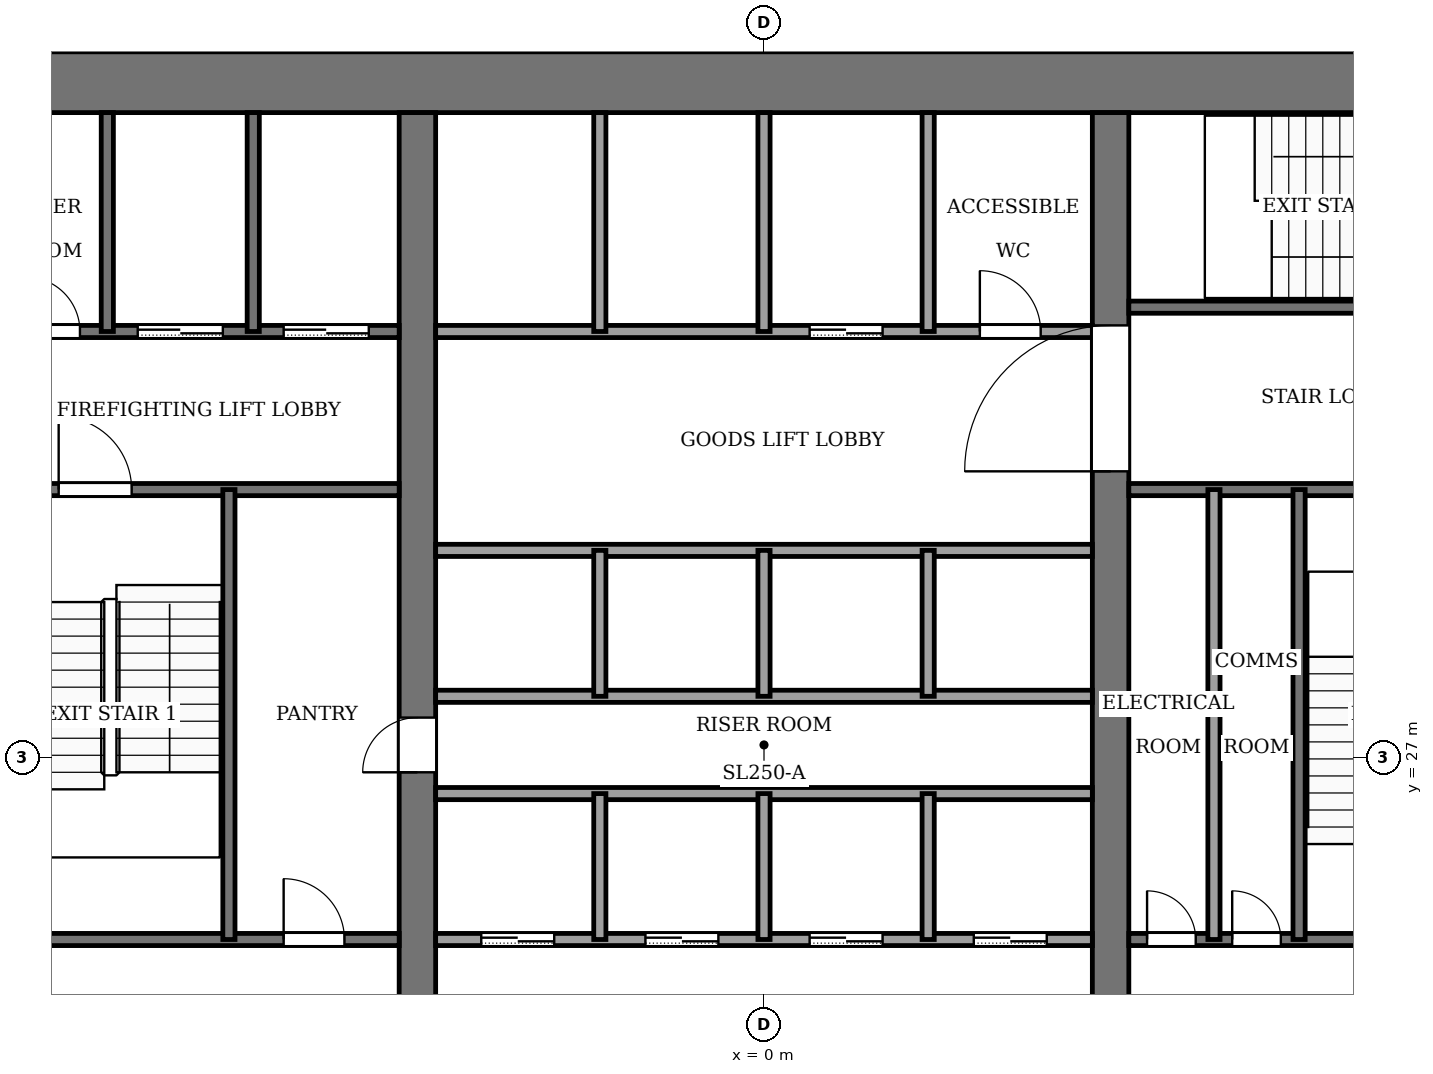
"""IFC4 building model, lengths in metres.
Left out: names, types, materials, properties, quantities, classifications, styles, units other than length and angle.
Written with IfcOpenShell. Run it as: python <this file> out.ifc"""

import sys

from ifc_helpers import new_model, si_unit, direction, frame, frame_2d, origin, place, context, subcontext, project, spatial, rectangle, extrude, element, fill, save


model = new_model("IFC4")
c1 = context("Model", 3, precision=1e-05, world=origin(), true_north=direction((0.0, 1.0)))
c2 = subcontext(c1, "Body", "Model", "MODEL_VIEW")
j1 = project(units=[si_unit("LENGTHUNIT", "METRE"), si_unit("PLANEANGLEUNIT", "RADIAN")], contexts=[c1])
p1 = place(None, origin())
s1 = spatial("IfcSite", under=j1, at=p1, CompositionType="ELEMENT")
p2 = place(p1, origin())
s2 = spatial("IfcBuilding", under=s1, at=p2, CompositionType="ELEMENT")
p3 = place(p2, frame((0.0, 0.0, 126.0)))
s3 = spatial("IfcBuildingStorey", under=s2, at=p3, CompositionType="ELEMENT", Elevation=126.0)
p4 = place(p3, frame((-13.6, 38.1, -0.13), z_axis=(0.0, 0.0, 1.0), x_axis=(1.0, 0.0, 0.0)))
e1 = element("IfcWall", 1, at=p4, inside=s3, PredefinedType="SHEAR", context=c2, shape_type="SweptSolid", body=[
    extrude(rectangle(XDim=27.2, YDim=1.0, at=frame_2d((13.6, 0.0))), origin(), (0.0, 0.0, 1.0), 4.0),
])
p5 = place(p3, frame((-5.7, 18.4, -0.13), z_axis=(0.0, 0.0, 1.0), x_axis=(0.0, 1.0, 0.0)))
e2 = element("IfcWall", 2, at=p5, inside=s3, PredefinedType="SHEAR", context=c2, shape_type="SweptSolid", body=[
    extrude(rectangle(XDim=19.2, YDim=0.6, at=frame_2d((9.6, 0.0))), origin(), (0.0, 0.0, 1.0), 4.0),
])
p6 = place(p5, frame((8.35, 0.0, 0.13)))
e3 = element("IfcOpeningElement", 3, at=p6, cuts=e2, PredefinedType="OPENING", context=c2, shape_type="SweptSolid", body=[
    extrude(rectangle(XDim=0.9, YDim=2.1, at=frame_2d((0.45, 1.05))), frame((0.0, 0.31, 0.0), z_axis=(0.0, -1.0, 0.0), x_axis=(1.0, 0.0, 0.0)), (0.0, 0.0, 1.0), 0.62),
])
p7 = place(p3, frame((5.7, 18.4, -0.13), z_axis=(0.0, 0.0, 1.0), x_axis=(0.0, 1.0, 0.0)))
e4 = element("IfcWall", 4, at=p7, inside=s3, PredefinedType="SHEAR", context=c2, shape_type="SweptSolid", body=[
    extrude(rectangle(XDim=19.2, YDim=0.6, at=frame_2d((9.6, 0.0))), origin(), (0.0, 0.0, 1.0), 4.0),
])
p8 = place(p7, frame((13.3, 0.0, 0.13)))
e5 = element("IfcOpeningElement", 5, at=p8, cuts=e4, PredefinedType="OPENING", context=c2, shape_type="SweptSolid", body=[
    extrude(rectangle(XDim=2.4, YDim=2.4, at=frame_2d((1.2, 1.2))), frame((0.0, 0.31, 0.0), z_axis=(0.0, -1.0, 0.0), x_axis=(1.0, 0.0, 0.0)), (0.0, 0.0, 1.0), 0.62),
])
p9 = place(p3, frame((-12.6, 24.0, 0.0), z_axis=(0.0, 0.0, 1.0), x_axis=(1.0, 0.0, 0.0)))
e6 = element("IfcWall", 6, at=p9, inside=s3, PredefinedType="PARTITIONING", context=c2, shape_type="SweptSolid", body=[
    extrude(rectangle(XDim=6.6, YDim=0.2, at=frame_2d((3.3, 0.0))), origin(), (0.0, 0.0, 1.0), 3.87),
])
p10 = place(p9, frame((4.7, 0.0, 0.0)))
e7 = element("IfcOpeningElement", 7, at=p10, cuts=e6, PredefinedType="OPENING", context=c2, shape_type="SweptSolid", body=[
    extrude(rectangle(XDim=1.0, YDim=2.1, at=frame_2d((0.5, 1.05))), frame((0.0, 0.11, 0.0), z_axis=(0.0, -1.0, 0.0), x_axis=(1.0, 0.0, 0.0)), (0.0, 0.0, 1.0), 0.22),
])
p11 = place(p3, frame((-5.4, 24.0, 0.0), z_axis=(0.0, 0.0, 1.0), x_axis=(1.0, 0.0, 0.0)))
e8 = element("IfcWall", 8, at=p11, inside=s3, PredefinedType="PARTITIONING", context=c2, shape_type="SweptSolid", body=[
    extrude(rectangle(XDim=10.8, YDim=0.2, at=frame_2d((5.4, 0.0))), origin(), (0.0, 0.0, 1.0), 3.87),
])
p12 = place(p11, frame((0.75, 0.0, 0.0)))
e9 = element("IfcOpeningElement", 9, at=p12, cuts=e8, PredefinedType="OPENING", context=c2, shape_type="SweptSolid", body=[
    extrude(rectangle(XDim=1.2, YDim=2.2, at=frame_2d((0.6, 1.1))), frame((0.0, 0.11, 0.0), z_axis=(0.0, -1.0, 0.0), x_axis=(1.0, 0.0, 0.0)), (0.0, 0.0, 1.0), 0.22),
])
p13 = place(p11, frame((3.45, 0.0, 0.0)))
e10 = element("IfcOpeningElement", 10, at=p13, cuts=e8, PredefinedType="OPENING", context=c2, shape_type="SweptSolid", body=[
    extrude(rectangle(XDim=1.2, YDim=2.2, at=frame_2d((0.6, 1.1))), frame((0.0, 0.11, 0.0), z_axis=(0.0, -1.0, 0.0), x_axis=(1.0, 0.0, 0.0)), (0.0, 0.0, 1.0), 0.22),
])
p14 = place(p11, frame((6.15, 0.0, 0.0)))
e11 = element("IfcOpeningElement", 11, at=p14, cuts=e8, PredefinedType="OPENING", context=c2, shape_type="SweptSolid", body=[
    extrude(rectangle(XDim=1.2, YDim=2.2, at=frame_2d((0.6, 1.1))), frame((0.0, 0.11, 0.0), z_axis=(0.0, -1.0, 0.0), x_axis=(1.0, 0.0, 0.0)), (0.0, 0.0, 1.0), 0.22),
])
p15 = place(p11, frame((8.85, 0.0, 0.0)))
e12 = element("IfcOpeningElement", 12, at=p15, cuts=e8, PredefinedType="OPENING", context=c2, shape_type="SweptSolid", body=[
    extrude(rectangle(XDim=1.2, YDim=2.2, at=frame_2d((0.6, 1.1))), frame((0.0, 0.11, 0.0), z_axis=(0.0, -1.0, 0.0), x_axis=(1.0, 0.0, 0.0)), (0.0, 0.0, 1.0), 0.22),
])
p16 = place(p3, frame((6.0, 24.0, 0.0), z_axis=(0.0, 0.0, 1.0), x_axis=(1.0, 0.0, 0.0)))
e13 = element("IfcWall", 13, at=p16, inside=s3, PredefinedType="PARTITIONING", context=c2, shape_type="SweptSolid", body=[
    extrude(rectangle(XDim=6.6, YDim=0.2, at=frame_2d((3.3, 0.0))), origin(), (0.0, 0.0, 1.0), 3.87),
])
p17 = place(p16, frame((0.3, 0.0, 0.0)))
e14 = element("IfcOpeningElement", 14, at=p17, cuts=e13, PredefinedType="OPENING", context=c2, shape_type="SweptSolid", body=[
    extrude(rectangle(XDim=0.8, YDim=2.1, at=frame_2d((0.4, 1.05))), frame((0.0, 0.11, 0.0), z_axis=(0.0, -1.0, 0.0), x_axis=(1.0, 0.0, 0.0)), (0.0, 0.0, 1.0), 0.22),
])
p18 = place(p16, frame((1.7, 0.0, 0.0)))
e15 = element("IfcOpeningElement", 15, at=p18, cuts=e13, PredefinedType="OPENING", context=c2, shape_type="SweptSolid", body=[
    extrude(rectangle(XDim=0.8, YDim=2.1, at=frame_2d((0.4, 1.05))), frame((0.0, 0.11, 0.0), z_axis=(0.0, -1.0, 0.0), x_axis=(1.0, 0.0, 0.0)), (0.0, 0.0, 1.0), 0.22),
])
p19 = place(p16, frame((4.4, 0.0, 0.0)))
e16 = element("IfcOpeningElement", 16, at=p19, cuts=e13, PredefinedType="OPENING", context=c2, shape_type="SweptSolid", body=[
    extrude(rectangle(XDim=1.2, YDim=2.2, at=frame_2d((0.6, 1.1))), frame((0.0, 0.11, 0.0), z_axis=(0.0, -1.0, 0.0), x_axis=(1.0, 0.0, 0.0)), (0.0, 0.0, 1.0), 0.22),
])
for number, where, z_axis, x_axis in (
    (17, (-5.4, 26.4, 0.0), (0.0, 0.0, 1.0), (1.0, 0.0, 0.0)),
    (18, (-5.4, 28.0, 0.0), (0.0, 0.0, 1.0), (1.0, 0.0, 0.0)),
    (19, (-5.4, 30.4, 0.0), (0.0, 0.0, 1.0), (1.0, 0.0, 0.0)),
):
    element("IfcWall", number, at=place(p3, frame(where, z_axis=z_axis, x_axis=x_axis)), inside=s3, PredefinedType="PARTITIONING", context=c2, shape_type="SweptSolid", body=[
        extrude(rectangle(XDim=10.8, YDim=0.2, at=frame_2d((5.4, 0.0))), origin(), (0.0, 0.0, 1.0), 3.87),
    ])
p20 = place(p3, frame((-12.6, 31.4, 0.0), z_axis=(0.0, 0.0, 1.0), x_axis=(1.0, 0.0, 0.0)))
e20 = element("IfcWall", 20, at=p20, inside=s3, PredefinedType="PARTITIONING", context=c2, shape_type="SweptSolid", body=[
    extrude(rectangle(XDim=6.6, YDim=0.2, at=frame_2d((3.3, 0.0))), origin(), (0.0, 0.0, 1.0), 3.87),
])
p21 = place(p20, frame((1.0, 0.0, 0.0)))
e21 = element("IfcOpeningElement", 21, at=p21, cuts=e20, PredefinedType="OPENING", context=c2, shape_type="SweptSolid", body=[
    extrude(rectangle(XDim=1.2, YDim=2.2, at=frame_2d((0.6, 1.1))), frame((0.0, 0.11, 0.0), z_axis=(0.0, -1.0, 0.0), x_axis=(1.0, 0.0, 0.0)), (0.0, 0.0, 1.0), 0.22),
])
p22 = place(p3, frame((6.0, 31.4, 0.0), z_axis=(0.0, 0.0, 1.0), x_axis=(1.0, 0.0, 0.0)))
e22 = element("IfcWall", 22, at=p22, inside=s3, PredefinedType="PARTITIONING", context=c2, shape_type="SweptSolid", body=[
    extrude(rectangle(XDim=6.6, YDim=0.2, at=frame_2d((3.3, 0.0))), origin(), (0.0, 0.0, 1.0), 3.87),
])
p23 = place(p3, frame((-12.6, 34.0, 0.0), z_axis=(0.0, 0.0, 1.0), x_axis=(1.0, 0.0, 0.0)))
e23 = element("IfcWall", 23, at=p23, inside=s3, PredefinedType="PARTITIONING", context=c2, shape_type="SweptSolid", body=[
    extrude(rectangle(XDim=6.6, YDim=0.2, at=frame_2d((3.3, 0.0))), origin(), (0.0, 0.0, 1.0), 3.87),
])
p24 = place(p23, frame((4.7, 0.0, 0.0)))
e24 = element("IfcOpeningElement", 24, at=p24, cuts=e23, PredefinedType="OPENING", context=c2, shape_type="SweptSolid", body=[
    extrude(rectangle(XDim=1.4, YDim=2.2, at=frame_2d((0.7, 1.1))), frame((0.0, 0.11, 0.0), z_axis=(0.0, -1.0, 0.0), x_axis=(1.0, 0.0, 0.0)), (0.0, 0.0, 1.0), 0.22),
])
p25 = place(p23, frame((2.3, 0.0, 0.0)))
e25 = element("IfcOpeningElement", 25, at=p25, cuts=e23, PredefinedType="OPENING", context=c2, shape_type="SweptSolid", body=[
    extrude(rectangle(XDim=1.4, YDim=2.2, at=frame_2d((0.7, 1.1))), frame((0.0, 0.11, 0.0), z_axis=(0.0, -1.0, 0.0), x_axis=(1.0, 0.0, 0.0)), (0.0, 0.0, 1.0), 0.22),
])
p26 = place(p23, frame((0.45, 0.0, 0.0)))
e26 = element("IfcOpeningElement", 26, at=p26, cuts=e23, PredefinedType="OPENING", context=c2, shape_type="SweptSolid", body=[
    extrude(rectangle(XDim=0.9, YDim=2.1, at=frame_2d((0.45, 1.05))), frame((0.0, 0.11, 0.0), z_axis=(0.0, -1.0, 0.0), x_axis=(1.0, 0.0, 0.0)), (0.0, 0.0, 1.0), 0.22),
])
p27 = place(p3, frame((-5.4, 34.0, 0.0), z_axis=(0.0, 0.0, 1.0), x_axis=(1.0, 0.0, 0.0)))
e27 = element("IfcWall", 27, at=p27, inside=s3, PredefinedType="PARTITIONING", context=c2, shape_type="SweptSolid", body=[
    extrude(rectangle(XDim=10.8, YDim=0.2, at=frame_2d((5.4, 0.0))), origin(), (0.0, 0.0, 1.0), 3.87),
])
p28 = place(p27, frame((6.15, 0.0, 0.0)))
e28 = element("IfcOpeningElement", 28, at=p28, cuts=e27, PredefinedType="OPENING", context=c2, shape_type="SweptSolid", body=[
    extrude(rectangle(XDim=1.2, YDim=2.2, at=frame_2d((0.6, 1.1))), frame((0.0, 0.11, 0.0), z_axis=(0.0, -1.0, 0.0), x_axis=(1.0, 0.0, 0.0)), (0.0, 0.0, 1.0), 0.22),
])
p29 = place(p27, frame((8.95, 0.0, 0.0)))
e29 = element("IfcOpeningElement", 29, at=p29, cuts=e27, PredefinedType="OPENING", context=c2, shape_type="SweptSolid", body=[
    extrude(rectangle(XDim=1.0, YDim=2.1, at=frame_2d((0.5, 1.05))), frame((0.0, 0.11, 0.0), z_axis=(0.0, -1.0, 0.0), x_axis=(1.0, 0.0, 0.0)), (0.0, 0.0, 1.0), 0.22),
])
p30 = place(p3, frame((6.0, 34.4, 0.0), z_axis=(0.0, 0.0, 1.0), x_axis=(1.0, 0.0, 0.0)))
e30 = element("IfcWall", 30, at=p30, inside=s3, PredefinedType="PARTITIONING", context=c2, shape_type="SweptSolid", body=[
    extrude(rectangle(XDim=6.6, YDim=0.2, at=frame_2d((3.3, 0.0))), origin(), (0.0, 0.0, 1.0), 3.87),
])
p31 = place(p30, frame((4.8, 0.0, 0.0)))
e31 = element("IfcOpeningElement", 31, at=p31, cuts=e30, PredefinedType="OPENING", context=c2, shape_type="SweptSolid", body=[
    extrude(rectangle(XDim=1.2, YDim=2.2, at=frame_2d((0.6, 1.1))), frame((0.0, 0.11, 0.0), z_axis=(0.0, -1.0, 0.0), x_axis=(1.0, 0.0, 0.0)), (0.0, 0.0, 1.0), 0.22),
])
p32 = place(p3, frame((-10.8, 34.0, 0.0), z_axis=(0.0, 0.0, 1.0), x_axis=(0.0, 1.0, 0.0)))
e32 = element("IfcWall", 32, at=p32, inside=s3, PredefinedType="PARTITIONING", context=c2, shape_type="SweptSolid", body=[
    extrude(rectangle(XDim=3.6, YDim=0.2, at=frame_2d((1.8, 0.0))), origin(), (0.0, 0.0, 1.0), 3.87),
])
p33 = place(p3, frame((-8.8, 24.0, 0.0), z_axis=(0.0, 0.0, 1.0), x_axis=(0.0, 1.0, 0.0)))
e33 = element("IfcWall", 33, at=p33, inside=s3, PredefinedType="PARTITIONING", context=c2, shape_type="SweptSolid", body=[
    extrude(rectangle(XDim=7.4, YDim=0.2, at=frame_2d((3.7, 0.0))), origin(), (0.0, 0.0, 1.0), 3.87),
])
p34 = place(p3, frame((-8.4, 34.0, 0.0), z_axis=(0.0, 0.0, 1.0), x_axis=(0.0, 1.0, 0.0)))
e34 = element("IfcWall", 34, at=p34, inside=s3, PredefinedType="PARTITIONING", context=c2, shape_type="SweptSolid", body=[
    extrude(rectangle(XDim=3.6, YDim=0.2, at=frame_2d((1.8, 0.0))), origin(), (0.0, 0.0, 1.0), 3.87),
])
for number, where, z_axis, x_axis in (
    (35, (-2.7, 24.0, 0.0), (0.0, 0.0, 1.0), (0.0, 1.0, 0.0)),
    (36, (-2.7, 28.0, 0.0), (0.0, 0.0, 1.0), (0.0, 1.0, 0.0)),
):
    element("IfcWall", number, at=place(p3, frame(where, z_axis=z_axis, x_axis=x_axis)), inside=s3, PredefinedType="PARTITIONING", context=c2, shape_type="SweptSolid", body=[
        extrude(rectangle(XDim=2.4, YDim=0.2, at=frame_2d((1.2, 0.0))), origin(), (0.0, 0.0, 1.0), 3.87),
    ])
p35 = place(p3, frame((-2.7, 34.0, 0.0), z_axis=(0.0, 0.0, 1.0), x_axis=(0.0, 1.0, 0.0)))
e37 = element("IfcWall", 37, at=p35, inside=s3, PredefinedType="PARTITIONING", context=c2, shape_type="SweptSolid", body=[
    extrude(rectangle(XDim=3.6, YDim=0.2, at=frame_2d((1.8, 0.0))), origin(), (0.0, 0.0, 1.0), 3.87),
])
for number, where, z_axis, x_axis in (
    (38, (0.0, 24.0, 0.0), (0.0, 0.0, 1.0), (0.0, 1.0, 0.0)),
    (39, (0.0, 28.0, 0.0), (0.0, 0.0, 1.0), (0.0, 1.0, 0.0)),
):
    element("IfcWall", number, at=place(p3, frame(where, z_axis=z_axis, x_axis=x_axis)), inside=s3, PredefinedType="PARTITIONING", context=c2, shape_type="SweptSolid", body=[
        extrude(rectangle(XDim=2.4, YDim=0.2, at=frame_2d((1.2, 0.0))), origin(), (0.0, 0.0, 1.0), 3.87),
    ])
p36 = place(p3, frame((0.0, 34.0, 0.0), z_axis=(0.0, 0.0, 1.0), x_axis=(0.0, 1.0, 0.0)))
e40 = element("IfcWall", 40, at=p36, inside=s3, PredefinedType="PARTITIONING", context=c2, shape_type="SweptSolid", body=[
    extrude(rectangle(XDim=3.6, YDim=0.2, at=frame_2d((1.8, 0.0))), origin(), (0.0, 0.0, 1.0), 3.87),
])
for number, where, z_axis, x_axis in (
    (41, (2.7, 24.0, 0.0), (0.0, 0.0, 1.0), (0.0, 1.0, 0.0)),
    (42, (2.7, 28.0, 0.0), (0.0, 0.0, 1.0), (0.0, 1.0, 0.0)),
):
    element("IfcWall", number, at=place(p3, frame(where, z_axis=z_axis, x_axis=x_axis)), inside=s3, PredefinedType="PARTITIONING", context=c2, shape_type="SweptSolid", body=[
        extrude(rectangle(XDim=2.4, YDim=0.2, at=frame_2d((1.2, 0.0))), origin(), (0.0, 0.0, 1.0), 3.87),
    ])
p37 = place(p3, frame((2.7, 34.0, 0.0), z_axis=(0.0, 0.0, 1.0), x_axis=(0.0, 1.0, 0.0)))
e43 = element("IfcWall", 43, at=p37, inside=s3, PredefinedType="PARTITIONING", context=c2, shape_type="SweptSolid", body=[
    extrude(rectangle(XDim=3.6, YDim=0.2, at=frame_2d((1.8, 0.0))), origin(), (0.0, 0.0, 1.0), 3.87),
])
for number, where, z_axis, x_axis in (
    (44, (7.4, 24.0, 0.0), (0.0, 0.0, 1.0), (0.0, 1.0, 0.0)),
    (45, (8.8, 24.0, 0.0), (0.0, 0.0, 1.0), (0.0, 1.0, 0.0)),
):
    element("IfcWall", number, at=place(p3, frame(where, z_axis=z_axis, x_axis=x_axis)), inside=s3, PredefinedType="PARTITIONING", context=c2, shape_type="SweptSolid", body=[
        extrude(rectangle(XDim=7.4, YDim=0.2, at=frame_2d((3.7, 0.0))), origin(), (0.0, 0.0, 1.0), 3.87),
    ])
p38 = place(p12, origin())
e46 = element("IfcDoor", 46, at=p38, inside=s3, OperationType="SLIDING_TO_LEFT", PredefinedType="DOOR", context=c2, shape_type="SweptSolid", body=[
    extrude(rectangle(XDim=1.2, YDim=2.2, at=frame_2d((0.6, 1.1))), frame((0.0, 0.025, 0.0), z_axis=(0.0, -1.0, 0.0), x_axis=(1.0, 0.0, 0.0)), (0.0, 0.0, 1.0), 0.05),
])
fill(e9, e46)
p39 = place(p13, origin())
e47 = element("IfcDoor", 47, at=p39, inside=s3, OperationType="SLIDING_TO_LEFT", PredefinedType="DOOR", context=c2, shape_type="SweptSolid", body=[
    extrude(rectangle(XDim=1.2, YDim=2.2, at=frame_2d((0.6, 1.1))), frame((0.0, 0.025, 0.0), z_axis=(0.0, -1.0, 0.0), x_axis=(1.0, 0.0, 0.0)), (0.0, 0.0, 1.0), 0.05),
])
fill(e10, e47)
p40 = place(p14, origin())
e48 = element("IfcDoor", 48, at=p40, inside=s3, OperationType="SLIDING_TO_LEFT", PredefinedType="DOOR", context=c2, shape_type="SweptSolid", body=[
    extrude(rectangle(XDim=1.2, YDim=2.2, at=frame_2d((0.6, 1.1))), frame((0.0, 0.025, 0.0), z_axis=(0.0, -1.0, 0.0), x_axis=(1.0, 0.0, 0.0)), (0.0, 0.0, 1.0), 0.05),
])
fill(e11, e48)
p41 = place(p15, origin())
e49 = element("IfcDoor", 49, at=p41, inside=s3, OperationType="SLIDING_TO_LEFT", PredefinedType="DOOR", context=c2, shape_type="SweptSolid", body=[
    extrude(rectangle(XDim=1.2, YDim=2.2, at=frame_2d((0.6, 1.1))), frame((0.0, 0.025, 0.0), z_axis=(0.0, -1.0, 0.0), x_axis=(1.0, 0.0, 0.0)), (0.0, 0.0, 1.0), 0.05),
])
fill(e12, e49)
p42 = place(p28, origin())
e50 = element("IfcDoor", 50, at=p42, inside=s3, OperationType="SLIDING_TO_LEFT", PredefinedType="DOOR", context=c2, shape_type="SweptSolid", body=[
    extrude(rectangle(XDim=1.2, YDim=2.2, at=frame_2d((0.6, 1.1))), frame((0.0, 0.025, 0.0), z_axis=(0.0, -1.0, 0.0), x_axis=(1.0, 0.0, 0.0)), (0.0, 0.0, 1.0), 0.05),
])
fill(e28, e50)
p43 = place(p24, origin())
e51 = element("IfcDoor", 51, at=p43, inside=s3, OperationType="SLIDING_TO_LEFT", PredefinedType="DOOR", context=c2, shape_type="SweptSolid", body=[
    extrude(rectangle(XDim=1.4, YDim=2.2, at=frame_2d((0.7, 1.1))), frame((0.0, 0.025, 0.0), z_axis=(0.0, -1.0, 0.0), x_axis=(1.0, 0.0, 0.0)), (0.0, 0.0, 1.0), 0.05),
])
fill(e24, e51)
p44 = place(p25, origin())
e52 = element("IfcDoor", 52, at=p44, inside=s3, OperationType="SLIDING_TO_LEFT", PredefinedType="DOOR", context=c2, shape_type="SweptSolid", body=[
    extrude(rectangle(XDim=1.4, YDim=2.2, at=frame_2d((0.7, 1.1))), frame((0.0, 0.025, 0.0), z_axis=(0.0, -1.0, 0.0), x_axis=(1.0, 0.0, 0.0)), (0.0, 0.0, 1.0), 0.05),
])
fill(e25, e52)
p45 = place(p26, origin())
e53 = element("IfcDoor", 53, at=p45, inside=s3, OperationType="SINGLE_SWING_RIGHT", PredefinedType="DOOR", context=c2, shape_type="SweptSolid", body=[
    extrude(rectangle(XDim=0.9, YDim=2.1, at=frame_2d((0.45, 1.05))), frame((0.0, 0.025, 0.0), z_axis=(0.0, -1.0, 0.0), x_axis=(1.0, 0.0, 0.0)), (0.0, 0.0, 1.0), 0.05),
])
fill(e26, e53)
p46 = place(p10, origin())
e54 = element("IfcDoor", 54, at=p46, inside=s3, OperationType="SINGLE_SWING_LEFT", PredefinedType="DOOR", context=c2, shape_type="SweptSolid", body=[
    extrude(rectangle(XDim=1.0, YDim=2.1, at=frame_2d((0.5, 1.05))), frame((0.0, 0.025, 0.0), z_axis=(0.0, -1.0, 0.0), x_axis=(1.0, 0.0, 0.0)), (0.0, 0.0, 1.0), 0.05),
])
fill(e7, e54)
p47 = place(p17, origin())
e55 = element("IfcDoor", 55, at=p47, inside=s3, OperationType="SINGLE_SWING_LEFT", PredefinedType="DOOR", context=c2, shape_type="SweptSolid", body=[
    extrude(rectangle(XDim=0.8, YDim=2.1, at=frame_2d((0.4, 1.05))), frame((0.0, 0.025, 0.0), z_axis=(0.0, -1.0, 0.0), x_axis=(1.0, 0.0, 0.0)), (0.0, 0.0, 1.0), 0.05),
])
fill(e14, e55)
p48 = place(p18, origin())
e56 = element("IfcDoor", 56, at=p48, inside=s3, OperationType="SINGLE_SWING_RIGHT", PredefinedType="DOOR", context=c2, shape_type="SweptSolid", body=[
    extrude(rectangle(XDim=0.8, YDim=2.1, at=frame_2d((0.4, 1.05))), frame((0.0, 0.025, 0.0), z_axis=(0.0, -1.0, 0.0), x_axis=(1.0, 0.0, 0.0)), (0.0, 0.0, 1.0), 0.05),
])
fill(e15, e56)
p49 = place(p29, origin())
e57 = element("IfcDoor", 57, at=p49, inside=s3, OperationType="SINGLE_SWING_LEFT", PredefinedType="DOOR", context=c2, shape_type="SweptSolid", body=[
    extrude(rectangle(XDim=1.0, YDim=2.1, at=frame_2d((0.5, 1.05))), frame((0.0, 0.025, 0.0), z_axis=(0.0, -1.0, 0.0), x_axis=(1.0, 0.0, 0.0)), (0.0, 0.0, 1.0), 0.05),
])
fill(e29, e57)
p50 = place(p6, origin())
e58 = element("IfcDoor", 58, at=p50, inside=s3, OperationType="SINGLE_SWING_RIGHT", PredefinedType="DOOR", context=c2, shape_type="SweptSolid", body=[
    extrude(rectangle(XDim=0.9, YDim=2.1, at=frame_2d((0.45, 1.05))), frame((0.0, 0.025, 0.0), z_axis=(0.0, -1.0, 0.0), x_axis=(1.0, 0.0, 0.0)), (0.0, 0.0, 1.0), 0.05),
])
fill(e3, e58)
p51 = place(p21, origin())
e59 = element("IfcDoor", 59, at=p51, inside=s3, OperationType="SINGLE_SWING_RIGHT", PredefinedType="DOOR", context=c2, shape_type="SweptSolid", body=[
    extrude(rectangle(XDim=1.2, YDim=2.2, at=frame_2d((0.6, 1.1))), frame((0.0, 0.025, 0.0), z_axis=(0.0, -1.0, 0.0), x_axis=(1.0, 0.0, 0.0)), (0.0, 0.0, 1.0), 0.05),
])
fill(e21, e59)
p52 = place(p8, origin())
e60 = element("IfcDoor", 60, at=p52, inside=s3, OperationType="DOUBLE_DOOR_SINGLE_SWING", PredefinedType="DOOR", context=c2, shape_type="SweptSolid", body=[
    extrude(rectangle(XDim=2.4, YDim=2.4, at=frame_2d((1.2, 1.2))), frame((0.0, 0.025, 0.0), z_axis=(0.0, -1.0, 0.0), x_axis=(1.0, 0.0, 0.0)), (0.0, 0.0, 1.0), 0.05),
])
fill(e5, e60)
save(model, sys.argv[1])
